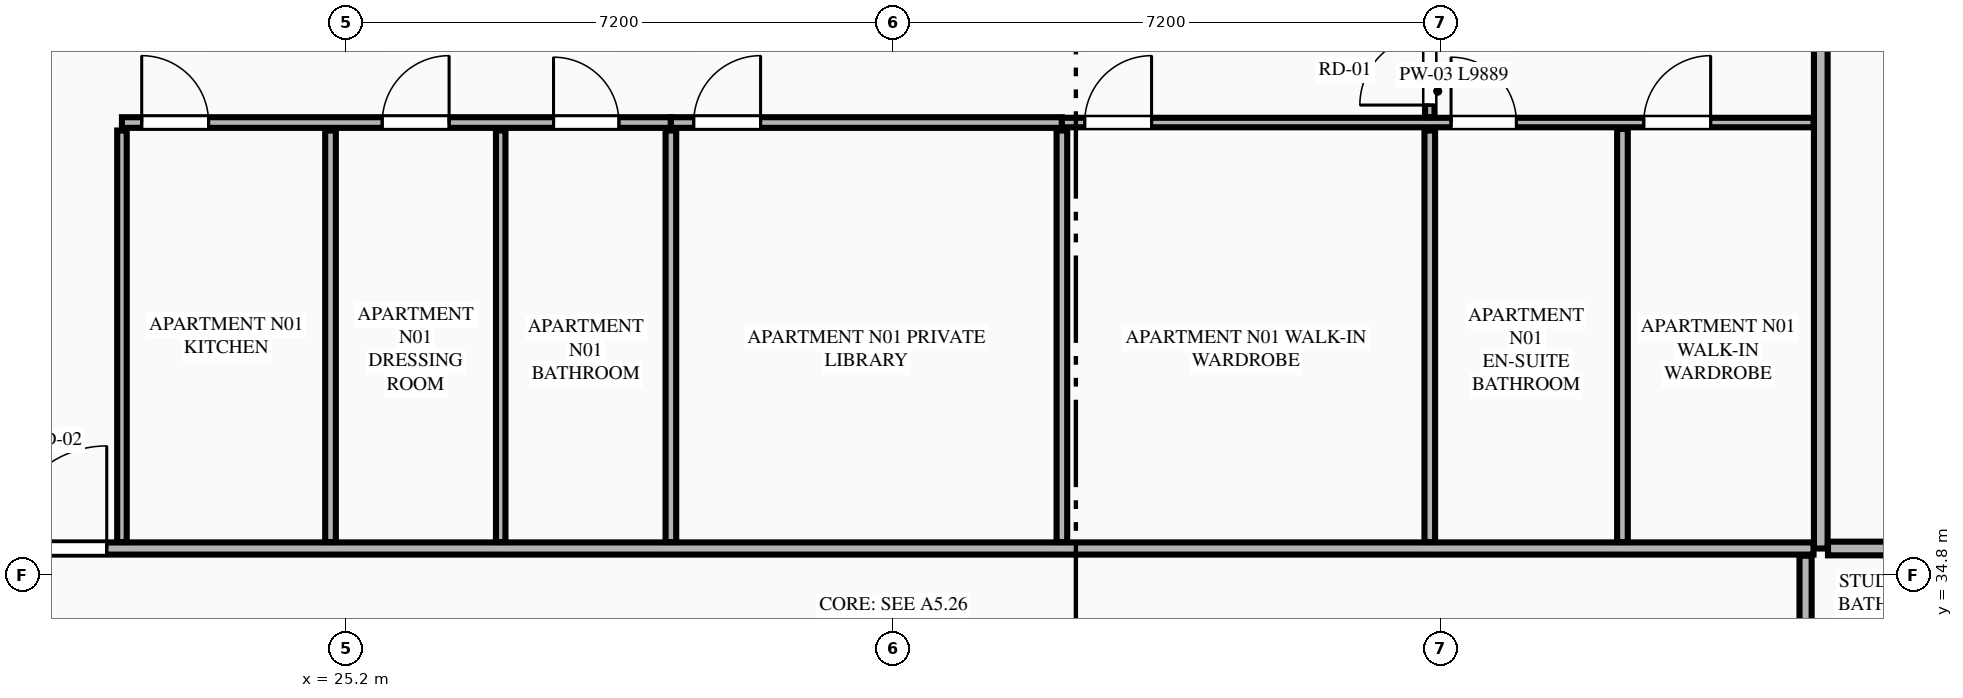
"""IFC4 building model, lengths in metres.
Left out: names, types, materials, properties, quantities, classifications, styles, units other than length and angle.
Written with IfcOpenShell. Run it as: python <this file> out.ifc"""

import sys

from ifc_helpers import new_model, si_unit, direction, frame, frame_2d, origin, place, context, subcontext, project, spatial, rectangle, extrude, element, fill, save


model = new_model("IFC4")
c1 = context("Model", 3, precision=1e-05, world=origin(), true_north=direction((0.0, 1.0)))
c2 = subcontext(c1, "Body", "Model", "MODEL_VIEW")
j1 = project(units=[si_unit("LENGTHUNIT", "METRE"), si_unit("PLANEANGLEUNIT", "RADIAN")], contexts=[c1])
p1 = place(None, origin())
s1 = spatial("IfcSite", under=j1, at=p1, CompositionType="ELEMENT")
p2 = place(p1, origin())
s2 = spatial("IfcBuilding", under=s1, at=p2, CompositionType="ELEMENT")
p3 = place(p2, frame((0.0, 0.0, 189.65)))
s3 = spatial("IfcBuildingStorey", under=s2, at=p3, CompositionType="ELEMENT", Elevation=189.65)
p4 = place(p3, frame((44.6, 35.15, 0.0), z_axis=(0.0, 0.0, 1.0), x_axis=(0.0, 1.0, 0.0)))
e1 = element("IfcWall", 1, at=p4, inside=s3, PredefinedType="PARTITIONING", context=c2, shape_type="SweptSolid", body=[
    extrude(rectangle(XDim=10.482, YDim=0.18, at=frame_2d((5.241, 0.0))), origin(), (0.0, 0.0, 1.0), 3.35),
])
p5 = place(p3, frame((20.295, 35.15, 0.0), z_axis=(0.0, 0.0, 1.0), x_axis=(1.0, 0.0, 0.0)))
e2 = element("IfcWall", 2, at=p5, inside=s3, PredefinedType="PARTITIONING", context=c2, shape_type="SweptSolid", body=[
    extrude(rectangle(XDim=24.21, YDim=0.16, at=frame_2d((12.105, 0.0))), origin(), (0.0, 0.0, 1.0), 3.35),
])
p6 = place(p5, frame((0.405, 0.0, 0.0)))
e3 = element("IfcOpeningElement", 3, at=p6, cuts=e2, PredefinedType="OPENING", context=c2, shape_type="SweptSolid", body=[
    extrude(rectangle(XDim=1.35, YDim=2.35, at=frame_2d((0.675, 1.175))), frame((0.0, 0.09, 0.0), z_axis=(0.0, -1.0, 0.0), x_axis=(1.0, 0.0, 0.0)), (0.0, 0.0, 1.0), 0.18),
])
p7 = place(p3, frame((22.25, 35.235, 0.0), z_axis=(0.0, 0.0, 1.0), x_axis=(0.0, 1.0, 0.0)))
e4 = element("IfcWall", 4, at=p7, inside=s3, PredefinedType="PARTITIONING", context=c2, shape_type="SweptSolid", body=[
    extrude(rectangle(XDim=5.414, YDim=0.125, at=frame_2d((2.707, 0.0))), origin(), (0.0, 0.0, 1.0), 2.807),
])
p8 = place(p3, frame((22.25, 40.754, 0.0), z_axis=(0.0, 0.0, 1.0), x_axis=(1.0, 0.0, 0.0)))
e5 = element("IfcWall", 5, at=p8, inside=s3, PredefinedType="PLUMBINGWALL", context=c2, shape_type="SweptSolid", body=[
    extrude(rectangle(XDim=7.222, YDim=0.14, at=frame_2d((3.611, 0.0))), origin(), (0.0, 0.0, 1.0), 3.35),
])
p9 = place(p8, frame((5.678, 0.0, 0.0)))
e6 = element("IfcOpeningElement", 6, at=p9, cuts=e5, PredefinedType="OPENING", context=c2, shape_type="SweptSolid", body=[
    extrude(rectangle(XDim=0.86, YDim=2.1, at=frame_2d((0.43, 1.05))), frame((0.0, 0.08, 0.0), z_axis=(0.0, -1.0, 0.0), x_axis=(1.0, 0.0, 0.0)), (0.0, 0.0, 1.0), 0.16),
])
p10 = place(p8, frame((0.26, 0.0, 0.0)))
e7 = element("IfcOpeningElement", 7, at=p10, cuts=e5, PredefinedType="OPENING", context=c2, shape_type="SweptSolid", body=[
    extrude(rectangle(XDim=0.88, YDim=2.15, at=frame_2d((0.44, 1.075))), frame((0.0, 0.08, 0.0), z_axis=(0.0, -1.0, 0.0), x_axis=(1.0, 0.0, 0.0)), (0.0, 0.0, 1.0), 0.16),
])
p11 = place(p8, frame((3.424, 0.0, 0.0)))
e8 = element("IfcOpeningElement", 8, at=p11, cuts=e5, PredefinedType="OPENING", context=c2, shape_type="SweptSolid", body=[
    extrude(rectangle(XDim=0.88, YDim=2.15, at=frame_2d((0.44, 1.075))), frame((0.0, 0.08, 0.0), z_axis=(0.0, -1.0, 0.0), x_axis=(1.0, 0.0, 0.0)), (0.0, 0.0, 1.0), 0.16),
])
p12 = place(p3, frame((29.472, 40.754, 0.0), z_axis=(0.0, 0.0, 1.0), x_axis=(1.0, 0.0, 0.0)))
e9 = element("IfcWall", 9, at=p12, inside=s3, PredefinedType="PLUMBINGWALL", context=c2, shape_type="SweptSolid", body=[
    extrude(rectangle(XDim=5.144, YDim=0.14, at=frame_2d((2.572, 0.0))), origin(), (0.0, 0.0, 1.0), 3.35),
])
p13 = place(p12, frame((0.3, 0.0, 0.0)))
e10 = element("IfcOpeningElement", 10, at=p13, cuts=e9, PredefinedType="OPENING", context=c2, shape_type="SweptSolid", body=[
    extrude(rectangle(XDim=0.88, YDim=2.15, at=frame_2d((0.44, 1.075))), frame((0.0, 0.08, 0.0), z_axis=(0.0, -1.0, 0.0), x_axis=(1.0, 0.0, 0.0)), (0.0, 0.0, 1.0), 0.16),
])
p14 = place(p3, frame((34.616, 40.754, 0.0), z_axis=(0.0, 0.0, 1.0), x_axis=(1.0, 0.0, 0.0)))
e11 = element("IfcWall", 11, at=p14, inside=s3, PredefinedType="PARTITIONING", context=c2, shape_type="SweptSolid", body=[
    extrude(rectangle(XDim=9.889, YDim=0.125, at=frame_2d((4.944, 0.0))), origin(), (0.0, 0.0, 1.0), 3.35),
])
p15 = place(p14, frame((5.12, 0.0, 0.0)))
e12 = element("IfcOpeningElement", 12, at=p15, cuts=e11, PredefinedType="OPENING", context=c2, shape_type="SweptSolid", body=[
    extrude(rectangle(XDim=0.86, YDim=2.1, at=frame_2d((0.43, 1.05))), frame((0.0, 0.073, 0.0), z_axis=(0.0, -1.0, 0.0), x_axis=(1.0, 0.0, 0.0)), (0.0, 0.0, 1.0), 0.145),
])
p16 = place(p14, frame((7.655, 0.0, 0.0)))
e13 = element("IfcOpeningElement", 13, at=p16, cuts=e11, PredefinedType="OPENING", context=c2, shape_type="SweptSolid", body=[
    extrude(rectangle(XDim=0.88, YDim=2.15, at=frame_2d((0.44, 1.075))), frame((0.0, 0.073, 0.0), z_axis=(0.0, -1.0, 0.0), x_axis=(1.0, 0.0, 0.0)), (0.0, 0.0, 1.0), 0.145),
])
p17 = place(p14, frame((0.3, 0.0, 0.0)))
e14 = element("IfcOpeningElement", 14, at=p17, cuts=e11, PredefinedType="OPENING", context=c2, shape_type="SweptSolid", body=[
    extrude(rectangle(XDim=0.88, YDim=2.15, at=frame_2d((0.44, 1.075))), frame((0.0, 0.073, 0.0), z_axis=(0.0, -1.0, 0.0), x_axis=(1.0, 0.0, 0.0)), (0.0, 0.0, 1.0), 0.145),
])
p18 = place(p3, frame((24.994, 35.235, 0.0), z_axis=(0.0, 0.0, 1.0), x_axis=(0.0, 1.0, 0.0)))
e15 = element("IfcWall", 15, at=p18, inside=s3, PredefinedType="PLUMBINGWALL", context=c2, shape_type="SweptSolid", body=[
    extrude(rectangle(XDim=5.414, YDim=0.14, at=frame_2d((2.707, 0.0))), origin(), (0.0, 0.0, 1.0), 3.35),
])
p19 = place(p3, frame((27.233, 35.235, 0.0), z_axis=(0.0, 0.0, 1.0), x_axis=(0.0, 1.0, 0.0)))
e16 = element("IfcWall", 16, at=p19, inside=s3, PredefinedType="PARTITIONING", context=c2, shape_type="SweptSolid", body=[
    extrude(rectangle(XDim=5.414, YDim=0.125, at=frame_2d((2.707, 0.0))), origin(), (0.0, 0.0, 1.0), 3.35),
])
p20 = place(p3, frame((39.456, 40.824, 0.0), z_axis=(0.0, 0.0, 1.0), x_axis=(0.0, 1.0, 0.0)))
e17 = element("IfcWall", 17, at=p20, inside=s3, PredefinedType="PARTITIONING", context=c2, shape_type="SweptSolid", body=[
    extrude(rectangle(XDim=1.33, YDim=0.125, at=frame_2d((0.665, 0.0))), origin(), (0.0, 0.0, 1.0), 3.35),
])
p21 = place(p20, frame((0.16, 0.0, 0.0)))
e18 = element("IfcOpeningElement", 18, at=p21, cuts=e17, PredefinedType="OPENING", context=c2, shape_type="SweptSolid", body=[
    extrude(rectangle(XDim=0.92, YDim=2.15, at=frame_2d((0.46, 1.075))), frame((0.0, 0.073, 0.0), z_axis=(0.0, -1.0, 0.0), x_axis=(1.0, 0.0, 0.0)), (0.0, 0.0, 1.0), 0.145),
])
for number, where, z_axis, x_axis in (
    (19, (29.472, 35.235, 0.0), (0.0, 0.0, 1.0), (0.0, 1.0, 0.0)),
    (20, (34.616, 35.235, 0.0), (0.0, 0.0, 1.0), (0.0, 1.0, 0.0)),
    (21, (39.456, 35.235, 0.0), (0.0, 0.0, 1.0), (0.0, 1.0, 0.0)),
):
    element("IfcWall", number, at=place(p3, frame(where, z_axis=z_axis, x_axis=x_axis)), inside=s3, PredefinedType="PLUMBINGWALL", context=c2, shape_type="SweptSolid", body=[
        extrude(rectangle(XDim=5.414, YDim=0.14, at=frame_2d((2.707, 0.0))), origin(), (0.0, 0.0, 1.0), 3.35),
    ])
p22 = place(p3, frame((41.991, 35.235, 0.0), z_axis=(0.0, 0.0, 1.0), x_axis=(0.0, 1.0, 0.0)))
e22 = element("IfcWall", 22, at=p22, inside=s3, PredefinedType="PLUMBINGWALL", context=c2, shape_type="SweptSolid", body=[
    extrude(rectangle(XDim=5.434, YDim=0.14, at=frame_2d((2.717, 0.0))), origin(), (0.0, 0.0, 1.0), 2.807),
])
p23 = place(p3, frame((44.695, 35.15, 0.0), z_axis=(0.0, 0.0, 1.0), x_axis=(1.0, 0.0, 0.0)))
e23 = element("IfcWall", 23, at=p23, inside=s3, PredefinedType="PARTITIONING", context=c2, shape_type="SweptSolid", body=[
    extrude(rectangle(XDim=5.995, YDim=0.18, at=frame_2d((2.998, 0.0))), origin(), (0.0, 0.0, 1.0), 3.35),
])
p24 = place(p3, frame((44.4, 29.197, 0.0), z_axis=(0.0, 0.0, 1.0), x_axis=(0.0, 1.0, 0.0)))
e24 = element("IfcWall", 24, at=p24, inside=s3, PredefinedType="PARTITIONING", context=c2, shape_type="SweptSolid", body=[
    extrude(rectangle(XDim=5.858, YDim=0.16, at=frame_2d((2.929, 0.0))), origin(), (0.0, 0.0, 1.0), 3.35),
])
p25 = place(p24, frame((0.4, 0.0, 0.0)))
e25 = element("IfcOpeningElement", 25, at=p25, cuts=e24, PredefinedType="OPENING", context=c2, shape_type="SweptSolid", body=[
    extrude(rectangle(XDim=1.02, YDim=2.25, at=frame_2d((0.51, 1.125))), frame((0.0, 0.09, 0.0), z_axis=(0.0, -1.0, 0.0), x_axis=(1.0, 0.0, 0.0)), (0.0, 0.0, 1.0), 0.18),
])
p26 = place(p9, origin())
e26 = element("IfcDoor", 26, at=p26, inside=s3, OperationType="SINGLE_SWING_LEFT", PredefinedType="DOOR", context=c2, shape_type="SweptSolid", body=[
    extrude(rectangle(XDim=0.86, YDim=2.1, at=frame_2d((0.43, 1.05))), frame((0.0, 0.025, 0.0), z_axis=(0.0, -1.0, 0.0), x_axis=(1.0, 0.0, 0.0)), (0.0, 0.0, 1.0), 0.05),
])
fill(e6, e26)
p27 = place(p15, origin())
e27 = element("IfcDoor", 27, at=p27, inside=s3, OperationType="SINGLE_SWING_LEFT", PredefinedType="DOOR", context=c2, shape_type="SweptSolid", body=[
    extrude(rectangle(XDim=0.86, YDim=2.1, at=frame_2d((0.43, 1.05))), frame((0.0, 0.025, 0.0), z_axis=(0.0, -1.0, 0.0), x_axis=(1.0, 0.0, 0.0)), (0.0, 0.0, 1.0), 0.05),
])
fill(e12, e27)
p28 = place(p16, origin())
e28 = element("IfcDoor", 28, at=p28, inside=s3, OperationType="SINGLE_SWING_RIGHT", PredefinedType="DOOR", context=c2, shape_type="SweptSolid", body=[
    extrude(rectangle(XDim=0.88, YDim=2.15, at=frame_2d((0.44, 1.075))), frame((0.0, 0.025, 0.0), z_axis=(0.0, -1.0, 0.0), x_axis=(1.0, 0.0, 0.0)), (0.0, 0.0, 1.0), 0.05),
])
fill(e13, e28)
p29 = place(p6, origin())
e29 = element("IfcDoor", 29, at=p29, inside=s3, OperationType="SINGLE_SWING_RIGHT", PredefinedType="DOOR", context=c2, shape_type="SweptSolid", body=[
    extrude(rectangle(XDim=1.35, YDim=2.35, at=frame_2d((0.675, 1.175))), frame((0.0, 0.025, 0.0), z_axis=(0.0, -1.0, 0.0), x_axis=(1.0, 0.0, 0.0)), (0.0, 0.0, 1.0), 0.05),
])
fill(e3, e29)
p30 = place(p10, origin())
e30 = element("IfcDoor", 30, at=p30, inside=s3, OperationType="SINGLE_SWING_LEFT", PredefinedType="DOOR", context=c2, shape_type="SweptSolid", body=[
    extrude(rectangle(XDim=0.88, YDim=2.15, at=frame_2d((0.44, 1.075))), frame((0.0, 0.025, 0.0), z_axis=(0.0, -1.0, 0.0), x_axis=(1.0, 0.0, 0.0)), (0.0, 0.0, 1.0), 0.05),
])
fill(e7, e30)
p31 = place(p11, origin())
e31 = element("IfcDoor", 31, at=p31, inside=s3, OperationType="SINGLE_SWING_RIGHT", PredefinedType="DOOR", context=c2, shape_type="SweptSolid", body=[
    extrude(rectangle(XDim=0.88, YDim=2.15, at=frame_2d((0.44, 1.075))), frame((0.0, 0.025, 0.0), z_axis=(0.0, -1.0, 0.0), x_axis=(1.0, 0.0, 0.0)), (0.0, 0.0, 1.0), 0.05),
])
fill(e8, e31)
p32 = place(p13, origin())
e32 = element("IfcDoor", 32, at=p32, inside=s3, OperationType="SINGLE_SWING_RIGHT", PredefinedType="DOOR", context=c2, shape_type="SweptSolid", body=[
    extrude(rectangle(XDim=0.88, YDim=2.15, at=frame_2d((0.44, 1.075))), frame((0.0, 0.025, 0.0), z_axis=(0.0, -1.0, 0.0), x_axis=(1.0, 0.0, 0.0)), (0.0, 0.0, 1.0), 0.05),
])
fill(e10, e32)
p33 = place(p21, origin())
e33 = element("IfcDoor", 33, at=p33, inside=s3, OperationType="SINGLE_SWING_LEFT", PredefinedType="DOOR", context=c2, shape_type="SweptSolid", body=[
    extrude(rectangle(XDim=0.92, YDim=2.15, at=frame_2d((0.46, 1.075))), frame((0.0, 0.025, 0.0), z_axis=(0.0, -1.0, 0.0), x_axis=(1.0, 0.0, 0.0)), (0.0, 0.0, 1.0), 0.05),
])
fill(e18, e33)
p34 = place(p17, origin())
e34 = element("IfcDoor", 34, at=p34, inside=s3, OperationType="SINGLE_SWING_RIGHT", PredefinedType="DOOR", context=c2, shape_type="SweptSolid", body=[
    extrude(rectangle(XDim=0.88, YDim=2.15, at=frame_2d((0.44, 1.075))), frame((0.0, 0.025, 0.0), z_axis=(0.0, -1.0, 0.0), x_axis=(1.0, 0.0, 0.0)), (0.0, 0.0, 1.0), 0.05),
])
fill(e14, e34)
save(model, sys.argv[1])
